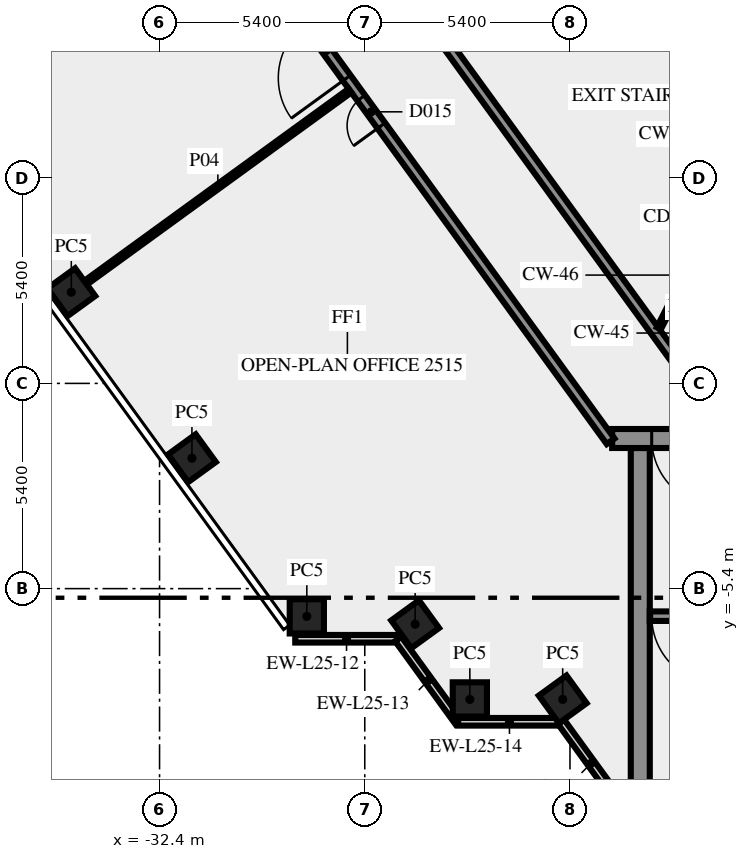
"""IFC4 building model, lengths in metres.
Left out: names, types, materials, properties, quantities, classifications, styles, units other than length and angle.
Written with IfcOpenShell. Run it as: python <this file> out.ifc"""

import sys

from ifc_helpers import new_model, si_unit, direction, frame, frame_2d, origin, origin_2d, place, context, subcontext, project, spatial, rectangle, extrude, element, fill, save


model = new_model("IFC4")
c1 = context("Model", 3, precision=1e-05, world=origin(), true_north=direction((0.0, 1.0)))
c2 = subcontext(c1, "Body", "Model", "MODEL_VIEW")
j1 = project(units=[si_unit("LENGTHUNIT", "METRE"), si_unit("PLANEANGLEUNIT", "RADIAN")], contexts=[c1])
p1 = place(None, origin())
s1 = spatial("IfcSite", under=j1, at=p1, CompositionType="ELEMENT")
p2 = place(p1, origin())
s2 = spatial("IfcBuilding", under=s1, at=p2, CompositionType="ELEMENT")
p3 = place(p2, frame((0.0, 0.0, 109.0)))
s3 = spatial("IfcBuildingStorey", under=s2, at=p3, CompositionType="ELEMENT", Elevation=109.0)
for number, where, z_axis, x_axis in (
    (1, (-34.722, 2.4, 0.0), (0.0, 0.0, 1.0), (0.588, -0.809, 0.0)),
    (2, (-31.548, -1.969, 0.0), (0.0, 0.0, 1.0), (0.588, -0.809, 0.0)),
    (3, (-28.525, -6.13, 0.0), (0.0, 0.0, 1.0), (1.0, 0.0, 0.0)),
    (4, (-25.674, -6.337, 0.0), (0.0, 0.0, 1.0), (0.588, -0.809, 0.0)),
    (5, (-24.235, -8.315, 0.0), (0.0, 0.0, 1.0), (1.0, 0.0, 0.0)),
    (6, (-21.792, -8.315, 0.0), (0.0, 0.0, 1.0), (0.588, -0.809, 0.0)),
):
    element("IfcColumn", number, at=place(p3, frame(where, z_axis=z_axis, x_axis=x_axis)), inside=s3, PredefinedType="COLUMN", context=c2, shape_type="SweptSolid", body=[
        extrude(rectangle(XDim=0.9, YDim=0.9, at=origin_2d()), origin(), (0.0, 0.0, 1.0), 3.65),
    ])
p4 = place(p3, frame((-28.83, -6.719, 0.0), z_axis=(0.0, 0.0, 1.0), x_axis=(1.0, 0.0, 0.0)))
e7 = element("IfcWall", 7, at=p4, inside=s3, PredefinedType="SOLIDWALL", context=c2, shape_type="SweptSolid", body=[
    extrude(rectangle(XDim=2.7, YDim=0.2, at=frame_2d((1.35, 0.0))), origin(), (0.0, 0.0, 1.0), 3.65),
])
p5 = place(p3, frame((-26.12, -6.724, 0.0), z_axis=(0.0, 0.0, 1.0), x_axis=(0.587720002413, -0.809064397168, 0.0)))
e8 = element("IfcWall", 8, at=p5, inside=s3, PredefinedType="SOLIDWALL", context=c2, shape_type="SweptSolid", body=[
    extrude(rectangle(XDim=2.7, YDim=0.2, at=frame_2d((1.35, 0.0))), origin(), (0.0, 0.0, 1.0), 3.65),
])
p6 = place(p3, frame((-24.543, -8.904, 0.0), z_axis=(0.0, 0.0, 1.0), x_axis=(1.0, 0.0, 0.0)))
e9 = element("IfcWall", 9, at=p6, inside=s3, PredefinedType="SOLIDWALL", context=c2, shape_type="SweptSolid", body=[
    extrude(rectangle(XDim=2.7, YDim=0.2, at=frame_2d((1.35, 0.0))), origin(), (0.0, 0.0, 1.0), 3.65),
])
p7 = place(p3, frame((-21.833, -8.909, 0.0), z_axis=(0.0, 0.0, 1.0), x_axis=(0.587766567315, -0.809030569476, 0.0)))
e10 = element("IfcWall", 10, at=p7, inside=s3, PredefinedType="SOLIDWALL", context=c2, shape_type="SweptSolid", body=[
    extrude(rectangle(XDim=2.688, YDim=0.2, at=frame_2d((1.344, 0.0))), origin(), (0.0, 0.0, 1.0), 3.65),
])
p8 = place(p3, frame((-19.75, -10.5, 0.0), z_axis=(0.0, 0.0, 1.0), x_axis=(0.0, 1.0, 0.0)))
e11 = element("IfcWall", 11, at=p8, inside=s3, PredefinedType="SHEAR", context=c2, shape_type="SweptSolid", body=[
    extrude(rectangle(XDim=8.8, YDim=0.5, at=frame_2d((4.4, 0.0))), origin(), (0.0, 0.0, 1.0), 3.65),
])
p9 = place(p3, frame((-11.45, -6.125, 0.0), z_axis=(0.0, 0.0, 1.0), x_axis=(-1.0, 0.0, 0.0)))
e12 = element("IfcWall", 12, at=p9, inside=s3, PredefinedType="SHEAR", context=c2, shape_type="SweptSolid", body=[
    extrude(rectangle(XDim=8.05, YDim=0.25, at=frame_2d((4.025, 0.0))), origin(), (0.0, 0.0, 1.0), 3.65),
])
p10 = place(p9, frame((6.2, 0.0, 0.0)))
e13 = element("IfcOpeningElement", 13, at=p10, cuts=e12, PredefinedType="OPENING", context=c2, shape_type="SweptSolid", body=[
    extrude(rectangle(XDim=1.8, YDim=2.1, at=frame_2d((0.9, 1.05))), frame((0.0, 0.135, 0.0), z_axis=(0.0, -1.0, 0.0), x_axis=(1.0, 0.0, 0.0)), (0.0, 0.0, 1.0), 0.27),
])
p11 = place(p3, frame((20.49, -1.45, 0.0), z_axis=(0.0, 0.0, 1.0), x_axis=(-1.0, 0.0, 0.0)))
e14 = element("IfcWall", 14, at=p11, inside=s3, PredefinedType="SHEAR", context=c2, shape_type="SweptSolid", body=[
    extrude(rectangle(XDim=40.98, YDim=0.5, at=frame_2d((20.49, 0.0))), origin(), (0.0, 0.0, 1.0), 3.65),
])
p12 = place(p11, frame((38.14, 0.0, 0.0)))
e15 = element("IfcOpeningElement", 15, at=p12, cuts=e14, PredefinedType="OPENING", context=c2, shape_type="SweptSolid", body=[
    extrude(rectangle(XDim=1.8, YDim=2.1, at=frame_2d((0.9, 1.05))), frame((0.0, 0.26, 0.0), z_axis=(0.0, -1.0, 0.0), x_axis=(1.0, 0.0, 0.0)), (0.0, 0.0, 1.0), 0.52),
])
p13 = place(p11, frame((36.728, 0.0, 0.0)))
e16 = element("IfcOpeningElement", 16, at=p13, cuts=e14, PredefinedType="OPENING", context=c2, shape_type="SweptSolid", body=[
    extrude(rectangle(XDim=0.8, YDim=2.1, at=frame_2d((0.4, 1.05))), frame((0.0, 0.26, 0.0), z_axis=(0.0, -1.0, 0.0), x_axis=(1.0, 0.0, 0.0)), (0.0, 0.0, 1.0), 0.52),
])
p14 = place(p11, frame((35.153, 0.0, 0.0)))
e17 = element("IfcOpeningElement", 17, at=p14, cuts=e14, PredefinedType="OPENING", context=c2, shape_type="SweptSolid", body=[
    extrude(rectangle(XDim=0.8, YDim=2.1, at=frame_2d((0.4, 1.05))), frame((0.0, 0.26, 0.0), z_axis=(0.0, -1.0, 0.0), x_axis=(1.0, 0.0, 0.0)), (0.0, 0.0, 1.0), 0.52),
])
p15 = place(p11, frame((32.94, 0.0, 0.0)))
e18 = element("IfcOpeningElement", 18, at=p15, cuts=e14, PredefinedType="OPENING", context=c2, shape_type="SweptSolid", body=[
    extrude(rectangle(XDim=0.9, YDim=2.1, at=frame_2d((0.45, 1.05))), frame((0.0, 0.26, 0.0), z_axis=(0.0, -1.0, 0.0), x_axis=(1.0, 0.0, 0.0)), (0.0, 0.0, 1.0), 0.52),
])
p16 = place(p11, frame((21.765, 0.0, 0.0)))
e19 = element("IfcOpeningElement", 19, at=p16, cuts=e14, PredefinedType="OPENING", context=c2, shape_type="SweptSolid", body=[
    extrude(rectangle(XDim=2.0, YDim=2.1, at=frame_2d((1.0, 1.05))), frame((0.0, 0.26, 0.0), z_axis=(0.0, -1.0, 0.0), x_axis=(1.0, 0.0, 0.0)), (0.0, 0.0, 1.0), 0.52),
])
p17 = place(p11, frame((7.14, 0.0, 0.0)))
e20 = element("IfcOpeningElement", 20, at=p17, cuts=e14, PredefinedType="OPENING", context=c2, shape_type="SweptSolid", body=[
    extrude(rectangle(XDim=0.9, YDim=2.1, at=frame_2d((0.45, 1.05))), frame((0.0, 0.26, 0.0), z_axis=(0.0, -1.0, 0.0), x_axis=(1.0, 0.0, 0.0)), (0.0, 0.0, 1.0), 0.52),
])
p18 = place(p11, frame((4.19, 0.0, 0.0)))
e21 = element("IfcOpeningElement", 21, at=p18, cuts=e14, PredefinedType="OPENING", context=c2, shape_type="SweptSolid", body=[
    extrude(rectangle(XDim=0.9, YDim=2.1, at=frame_2d((0.45, 1.05))), frame((0.0, 0.26, 0.0), z_axis=(0.0, -1.0, 0.0), x_axis=(1.0, 0.0, 0.0)), (0.0, 0.0, 1.0), 0.52),
])
p19 = place(p11, frame((1.04, 0.0, 0.0)))
e22 = element("IfcOpeningElement", 22, at=p19, cuts=e14, PredefinedType="OPENING", context=c2, shape_type="SweptSolid", body=[
    extrude(rectangle(XDim=1.8, YDim=2.1, at=frame_2d((0.9, 1.05))), frame((0.0, 0.26, 0.0), z_axis=(0.0, -1.0, 0.0), x_axis=(1.0, 0.0, 0.0)), (0.0, 0.0, 1.0), 0.52),
])
p20 = place(p3, frame((-20.531, -1.523, 0.0), z_axis=(0.0, 0.0, 1.0), x_axis=(-0.587784522481, 0.809017524614, 0.0)))
e23 = element("IfcWall", 23, at=p20, inside=s3, PredefinedType="SOLIDWALL", context=c2, shape_type="SweptSolid", body=[
    extrude(rectangle(XDim=49.912, YDim=0.25, at=frame_2d((24.956, 0.0))), origin(), (0.0, 0.0, 1.0), 3.65),
])
p21 = place(p20, frame((10.266, 0.0, 0.0)))
e24 = element("IfcOpeningElement", 24, at=p21, cuts=e23, PredefinedType="OPENING", context=c2, shape_type="SweptSolid", body=[
    extrude(rectangle(XDim=0.9, YDim=2.1, at=frame_2d((0.45, 1.05))), frame((0.0, 0.135, 0.0), z_axis=(0.0, -1.0, 0.0), x_axis=(1.0, 0.0, 0.0)), (0.0, 0.0, 1.0), 0.27),
])
p22 = place(p20, frame((32.366, 0.0, 0.0)))
e25 = element("IfcOpeningElement", 25, at=p22, cuts=e23, PredefinedType="OPENING", context=c2, shape_type="SweptSolid", body=[
    extrude(rectangle(XDim=1.8, YDim=2.1, at=frame_2d((0.9, 1.05))), frame((0.0, 0.135, 0.0), z_axis=(0.0, -1.0, 0.0), x_axis=(1.0, 0.0, 0.0)), (0.0, 0.0, 1.0), 0.27),
])
p23 = place(p20, frame((11.815, 0.0, 0.0)))
e26 = element("IfcOpeningElement", 26, at=p23, cuts=e23, PredefinedType="OPENING", context=c2, shape_type="SweptSolid", body=[
    extrude(rectangle(XDim=1.8, YDim=2.1, at=frame_2d((0.9, 1.05))), frame((0.0, 0.135, 0.0), z_axis=(0.0, -1.0, 0.0), x_axis=(1.0, 0.0, 0.0)), (0.0, 0.0, 1.0), 0.27),
])
p24 = place(p20, frame((48.57, 0.0, 0.0)))
e27 = element("IfcOpeningElement", 27, at=p24, cuts=e23, PredefinedType="OPENING", context=c2, shape_type="SweptSolid", body=[
    extrude(rectangle(XDim=0.9, YDim=2.1, at=frame_2d((0.45, 1.05))), frame((0.0, 0.135, 0.0), z_axis=(0.0, -1.0, 0.0), x_axis=(1.0, 0.0, 0.0)), (0.0, 0.0, 1.0), 0.27),
])
p25 = place(p20, frame((35.915, 0.0, 0.0)))
e28 = element("IfcOpeningElement", 28, at=p25, cuts=e23, PredefinedType="OPENING", context=c2, shape_type="SweptSolid", body=[
    extrude(rectangle(XDim=0.9, YDim=2.1, at=frame_2d((0.45, 1.05))), frame((0.0, 0.135, 0.0), z_axis=(0.0, -1.0, 0.0), x_axis=(1.0, 0.0, 0.0)), (0.0, 0.0, 1.0), 0.27),
])
p26 = place(p3, frame((-37.232, 25.972, 0.0), z_axis=(0.0, 0.0, 1.0), x_axis=(0.587786323093, -0.809016216391, 0.0)))
e29 = element("IfcWall", 29, at=p26, inside=s3, PredefinedType="SOLIDWALL", context=c2, shape_type="SweptSolid", body=[
    extrude(rectangle(XDim=33.493, YDim=0.25, at=frame_2d((16.747, 0.0))), origin(), (0.0, 0.0, 1.0), 3.65),
])
p27 = place(p26, frame((5.385, 0.0, 0.0)))
e30 = element("IfcOpeningElement", 30, at=p27, cuts=e29, PredefinedType="OPENING", context=c2, shape_type="SweptSolid", body=[
    extrude(rectangle(XDim=0.9, YDim=2.1, at=frame_2d((0.45, 1.05))), frame((0.0, 0.135, 0.0), z_axis=(0.0, -1.0, 0.0), x_axis=(1.0, 0.0, 0.0)), (0.0, 0.0, 1.0), 0.27),
])
p28 = place(p26, frame((6.985, 0.0, 0.0)))
e31 = element("IfcOpeningElement", 31, at=p28, cuts=e29, PredefinedType="OPENING", context=c2, shape_type="SweptSolid", body=[
    extrude(rectangle(XDim=0.9, YDim=2.1, at=frame_2d((0.45, 1.05))), frame((0.0, 0.135, 0.0), z_axis=(0.0, -1.0, 0.0), x_axis=(1.0, 0.0, 0.0)), (0.0, 0.0, 1.0), 0.27),
])
p29 = place(p3, frame((-27.389, 7.703, 0.0), z_axis=(0.0, 0.0, 1.0), x_axis=(-0.809052894195, -0.587735837256, 0.0)))
e32 = element("IfcWall", 32, at=p29, inside=s3, PredefinedType="PARTITIONING", context=c2, shape_type="SweptSolid", body=[
    extrude(rectangle(XDim=8.594, YDim=0.12, at=frame_2d((4.297, 0.0))), origin(), (0.0, 0.0, 1.0), 3.65),
])
p30 = place(p3, frame((-19.261, 1.45, 0.0), z_axis=(0.0, 0.0, 1.0), x_axis=(0.453950796792, 0.891026752736, 0.0)))
e33 = element("IfcWall", 33, at=p30, inside=s3, PredefinedType="PARTITIONING", context=c2, shape_type="SweptSolid", body=[
    extrude(rectangle(XDim=2.778, YDim=0.12, at=frame_2d((1.389, 0.0))), origin(), (0.0, 0.0, 1.0), 3.65),
])
p31 = place(p10, origin())
e34 = element("IfcDoor", 34, at=p31, inside=s3, OperationType="DOUBLE_DOOR_SINGLE_SWING", PredefinedType="DOOR", context=c2, shape_type="SweptSolid", body=[
    extrude(rectangle(XDim=1.8, YDim=2.1, at=frame_2d((0.9, 1.05))), frame((0.0, 0.025, 0.0), z_axis=(0.0, -1.0, 0.0), x_axis=(1.0, 0.0, 0.0)), (0.0, 0.0, 1.0), 0.05),
])
fill(e13, e34)
p32 = place(p12, origin())
e35 = element("IfcDoor", 35, at=p32, inside=s3, OperationType="DOUBLE_DOOR_SINGLE_SWING", PredefinedType="DOOR", context=c2, shape_type="SweptSolid", body=[
    extrude(rectangle(XDim=1.8, YDim=2.1, at=frame_2d((0.9, 1.05))), frame((0.0, 0.025, 0.0), z_axis=(0.0, -1.0, 0.0), x_axis=(1.0, 0.0, 0.0)), (0.0, 0.0, 1.0), 0.05),
])
fill(e15, e35)
p33 = place(p21, origin())
e36 = element("IfcDoor", 36, at=p33, inside=s3, OperationType="SINGLE_SWING_RIGHT", PredefinedType="DOOR", context=c2, shape_type="SweptSolid", body=[
    extrude(rectangle(XDim=0.9, YDim=2.1, at=frame_2d((0.45, 1.05))), frame((0.0, 0.025, 0.0), z_axis=(0.0, -1.0, 0.0), x_axis=(1.0, 0.0, 0.0)), (0.0, 0.0, 1.0), 0.05),
])
fill(e24, e36)
p34 = place(p23, origin())
e37 = element("IfcDoor", 37, at=p34, inside=s3, OperationType="DOUBLE_DOOR_SINGLE_SWING", PredefinedType="DOOR", context=c2, shape_type="SweptSolid", body=[
    extrude(rectangle(XDim=1.8, YDim=2.1, at=frame_2d((0.9, 1.05))), frame((0.0, 0.025, 0.0), z_axis=(0.0, -1.0, 0.0), x_axis=(1.0, 0.0, 0.0)), (0.0, 0.0, 1.0), 0.05),
])
fill(e26, e37)
save(model, sys.argv[1])
